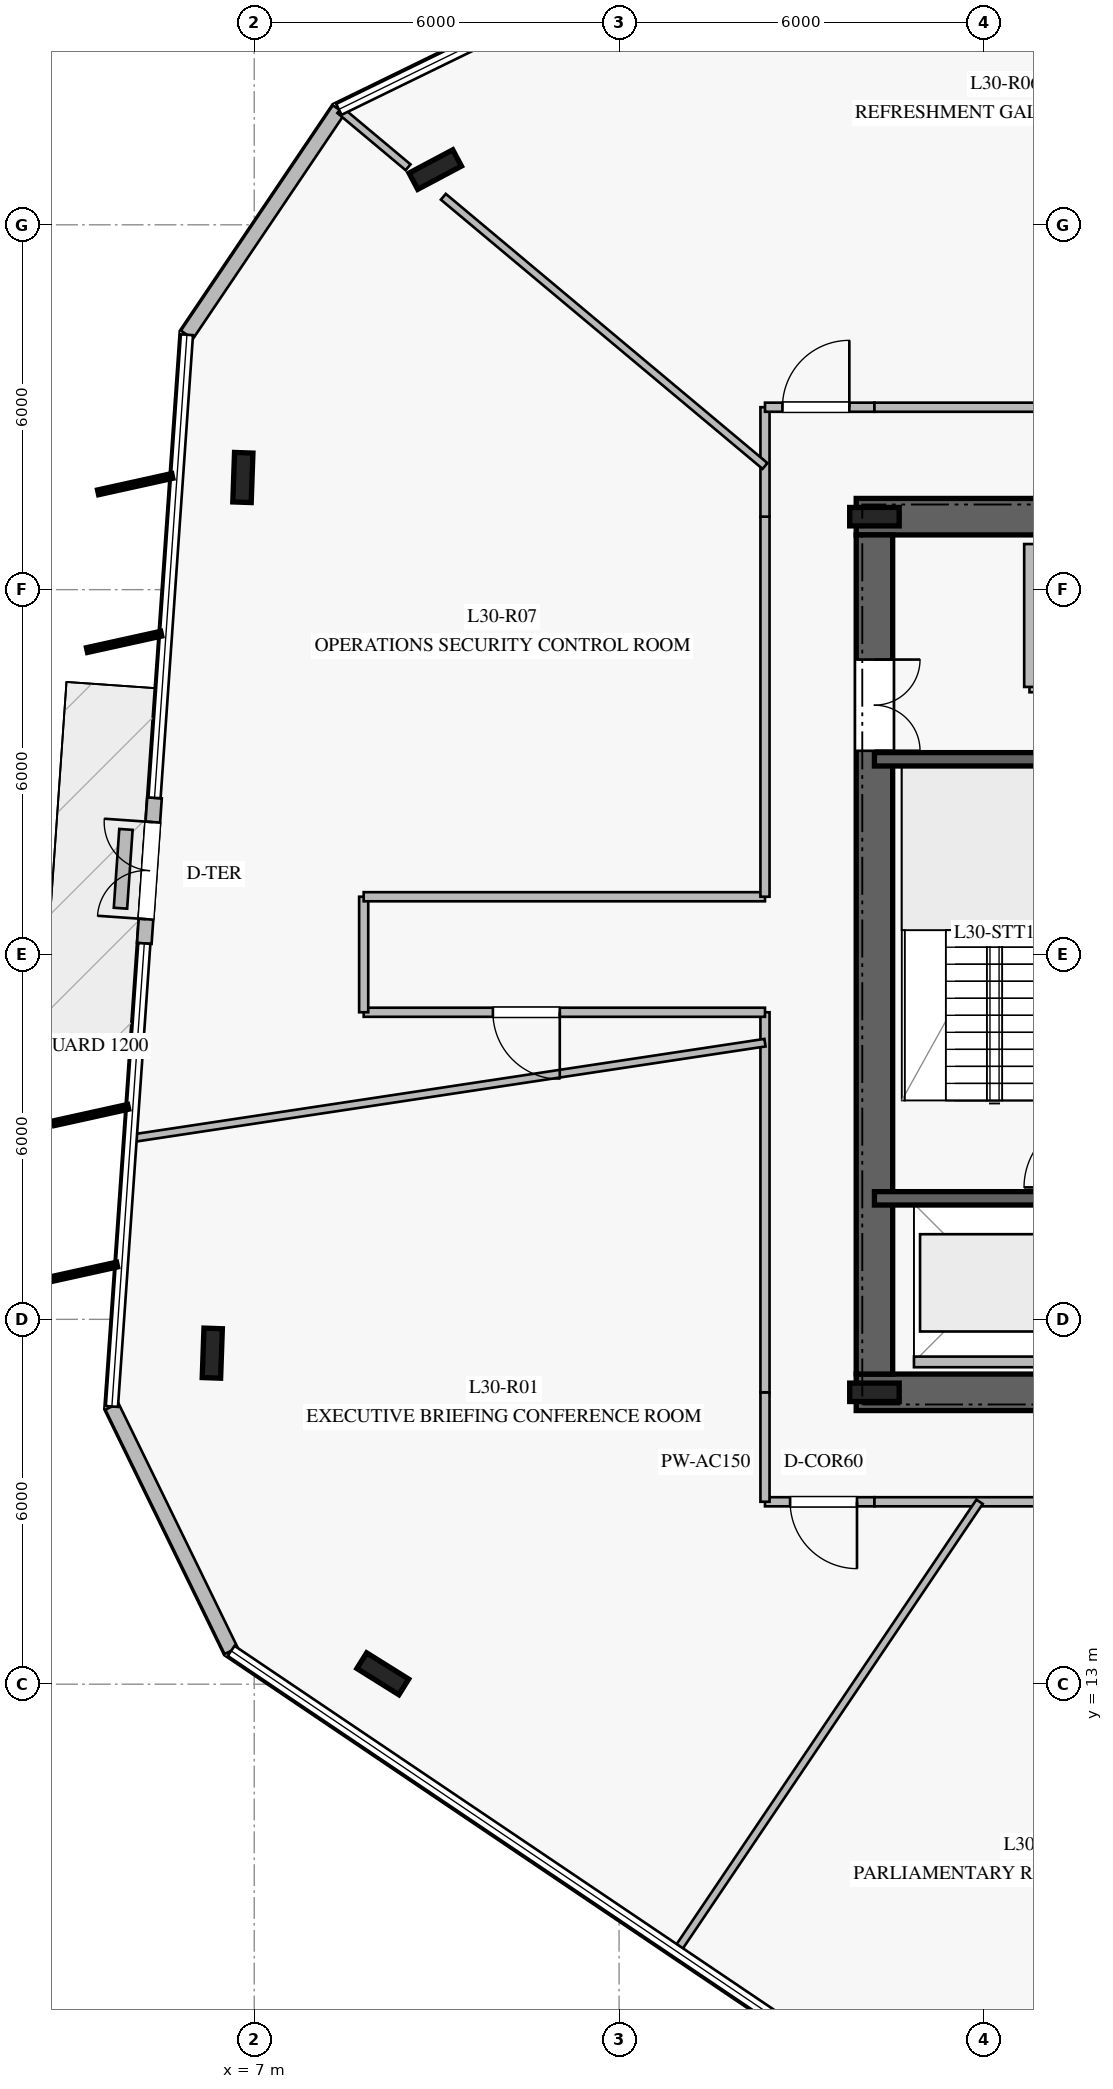
"""IFC4 building model, lengths in metres.
Left out: names, types, materials, properties, quantities, classifications, styles, units other than length and angle.
Written with IfcOpenShell. Run it as: python <this file> out.ifc"""

import sys

from ifc_helpers import new_model, si_unit, direction, frame, frame_2d, origin, origin_2d, place, context, subcontext, project, spatial, rectangle, i_section, extrude, element, fill, save


model = new_model("IFC4")
c1 = context("Model", 3, precision=1e-05, world=origin(), true_north=direction((0.0, 1.0)))
c2 = subcontext(c1, "Body", "Model", "MODEL_VIEW")
j1 = project(units=[si_unit("LENGTHUNIT", "METRE"), si_unit("PLANEANGLEUNIT", "RADIAN")], contexts=[c1])
p1 = place(None, origin())
s1 = spatial("IfcSite", under=j1, at=p1, CompositionType="ELEMENT")
p2 = place(p1, origin())
s2 = spatial("IfcBuilding", under=s1, at=p2, CompositionType="ELEMENT")
p3 = place(p2, frame((0.0, 0.0, 126.4)))
s3 = spatial("IfcBuildingStorey", under=s2, at=p3, CompositionType="ELEMENT", Elevation=126.4)
p4 = place(p3, frame((16.9, 17.8, 0.0), z_axis=(0.0, 0.0, 1.0), x_axis=(1.0, 0.0, 0.0)))
e1 = element("IfcWall", 1, at=p4, inside=s3, PredefinedType="SHEAR", context=c2, shape_type="SweptSolid", body=[
    extrude(rectangle(XDim=16.2, YDim=0.6, at=frame_2d((8.1, 0.0))), origin(), (0.0, 0.0, 1.0), 3.76),
])
p5 = place(p4, frame((5.05, 0.0, 0.0)))
e2 = element("IfcOpeningElement", 2, at=p5, cuts=e1, PredefinedType="OPENING", context=c2, shape_type="SweptSolid", body=[
    extrude(rectangle(XDim=1.2, YDim=2.25, at=frame_2d((0.6, 1.125))), frame((0.0, 0.31, 0.0), z_axis=(0.0, -1.0, 0.0), x_axis=(1.0, 0.0, 0.0)), (0.0, 0.0, 1.0), 0.62),
])
p6 = place(p4, frame((14.0, 0.0, 0.0)))
e3 = element("IfcOpeningElement", 3, at=p6, cuts=e1, PredefinedType="OPENING", context=c2, shape_type="SweptSolid", body=[
    extrude(rectangle(XDim=0.9, YDim=2.1, at=frame_2d((0.45, 1.05))), frame((0.0, 0.31, 0.0), z_axis=(0.0, -1.0, 0.0), x_axis=(1.0, 0.0, 0.0)), (0.0, 0.0, 1.0), 0.62),
])
p7 = place(p4, frame((9.25, 0.0, 0.0)))
e4 = element("IfcOpeningElement", 4, at=p7, cuts=e1, PredefinedType="OPENING", context=c2, shape_type="SweptSolid", body=[
    extrude(rectangle(XDim=1.1, YDim=2.2, at=frame_2d((0.55, 1.1))), frame((0.0, 0.31, 0.0), z_axis=(0.0, -1.0, 0.0), x_axis=(1.0, 0.0, 0.0)), (0.0, 0.0, 1.0), 0.62),
])
p8 = place(p3, frame((33.1, 32.2, 0.0), z_axis=(0.0, 0.0, 1.0), x_axis=(-1.0, 0.0, 0.0)))
e5 = element("IfcWall", 5, at=p8, inside=s3, PredefinedType="SHEAR", context=c2, shape_type="SweptSolid", body=[
    extrude(rectangle(XDim=16.2, YDim=0.6, at=frame_2d((8.1, 0.0))), origin(), (0.0, 0.0, 1.0), 3.76),
])
p9 = place(p8, frame((5.05, 0.0, 0.0)))
e6 = element("IfcOpeningElement", 6, at=p9, cuts=e5, PredefinedType="OPENING", context=c2, shape_type="SweptSolid", body=[
    extrude(rectangle(XDim=1.2, YDim=2.25, at=frame_2d((0.6, 1.125))), frame((0.0, 0.31, 0.0), z_axis=(0.0, -1.0, 0.0), x_axis=(1.0, 0.0, 0.0)), (0.0, 0.0, 1.0), 0.62),
])
p10 = place(p8, frame((11.85, 0.0, 0.0)))
e7 = element("IfcOpeningElement", 7, at=p10, cuts=e5, PredefinedType="OPENING", context=c2, shape_type="SweptSolid", body=[
    extrude(rectangle(XDim=1.1, YDim=2.2, at=frame_2d((0.55, 1.1))), frame((0.0, 0.31, 0.0), z_axis=(0.0, -1.0, 0.0), x_axis=(1.0, 0.0, 0.0)), (0.0, 0.0, 1.0), 0.62),
])
p11 = place(p8, frame((9.875, 0.0, 0.0)))
e8 = element("IfcOpeningElement", 8, at=p11, cuts=e5, PredefinedType="OPENING", context=c2, shape_type="SweptSolid", body=[
    extrude(rectangle(XDim=1.1, YDim=2.2, at=frame_2d((0.55, 1.1))), frame((0.0, 0.31, 0.0), z_axis=(0.0, -1.0, 0.0), x_axis=(1.0, 0.0, 0.0)), (0.0, 0.0, 1.0), 0.62),
])
p12 = place(p8, frame((7.9, 0.0, 0.0)))
e9 = element("IfcOpeningElement", 9, at=p12, cuts=e5, PredefinedType="OPENING", context=c2, shape_type="SweptSolid", body=[
    extrude(rectangle(XDim=1.1, YDim=2.2, at=frame_2d((0.55, 1.1))), frame((0.0, 0.31, 0.0), z_axis=(0.0, -1.0, 0.0), x_axis=(1.0, 0.0, 0.0)), (0.0, 0.0, 1.0), 0.62),
])
p13 = place(p3, frame((17.2, 31.9, 0.0), z_axis=(0.0, 0.0, 1.0), x_axis=(0.0, -1.0, 0.0)))
e10 = element("IfcWall", 10, at=p13, inside=s3, PredefinedType="SHEAR", context=c2, shape_type="SweptSolid", body=[
    extrude(rectangle(XDim=13.8, YDim=0.6, at=frame_2d((6.9, 0.0))), origin(), (0.0, 0.0, 1.0), 3.76),
])
p14 = place(p13, frame((2.05, 0.0, 0.0)))
e11 = element("IfcOpeningElement", 11, at=p14, cuts=e10, PredefinedType="OPENING", context=c2, shape_type="SweptSolid", body=[
    extrude(rectangle(XDim=1.5, YDim=2.2, at=frame_2d((0.75, 1.1))), frame((0.0, 0.31, 0.0), z_axis=(0.0, -1.0, 0.0), x_axis=(1.0, 0.0, 0.0)), (0.0, 0.0, 1.0), 0.62),
])
for number, where, z_axis, x_axis in (
    (12, (17.2, 17.8, 0.0), (0.0, 0.0, 1.0), (1.0, 0.0, 0.0)),
    (13, (17.2, 32.2, 0.0), (0.0, 0.0, 1.0), (1.0, 0.0, 0.0)),
):
    element("IfcColumn", number, at=place(p3, frame(where, z_axis=z_axis, x_axis=x_axis)), inside=s3, PredefinedType="COLUMN", context=c2, shape_type="SweptSolid", body=[
        extrude(i_section(OverallWidth=0.303, OverallDepth=0.814, WebThickness=0.021, FlangeThickness=0.04, at=origin_2d()), origin(), (0.0, 0.0, 1.0), 4.0),
    ])
for number, where, z_axis, x_axis in (
    (14, (17.2, 20.99, 0.0), (0.0, 0.0, 1.0), (1.0, 0.0, 0.0)),
    (15, (17.2, 28.21, 0.0), (0.0, 0.0, 1.0), (1.0, 0.0, 0.0)),
):
    element("IfcWall", number, at=place(p3, frame(where, z_axis=z_axis, x_axis=x_axis)), inside=s3, PredefinedType="SOLIDWALL", context=c2, shape_type="SweptSolid", body=[
        extrude(rectangle(XDim=3.72, YDim=0.22, at=frame_2d((1.86, 0.0))), origin(), (0.0, 0.0, 1.0), 3.76),
    ])
for number, where, z_axis, x_axis in (
    (16, (9.977, 37.908, 0.0), (0.0, 0.0, 1.0), (0.883, 0.469, 0.0)),
    (17, (6.813, 32.844, 0.0), (0.0, 0.0, 1.0), (0.035, 0.999, 0.0)),
    (18, (6.31, 18.444, 0.0), (0.0, 0.0, 1.0), (0.035, 0.999, 0.0)),
    (19, (9.114, 13.171, 0.0), (0.0, 0.0, 1.0), (-0.848, 0.53, 0.0)),
):
    element("IfcColumn", number, at=place(p3, frame(where, z_axis=z_axis, x_axis=x_axis)), inside=s3, PredefinedType="COLUMN", context=c2, shape_type="SweptSolid", body=[
        extrude(i_section(OverallWidth=0.303, OverallDepth=0.814, WebThickness=0.021, FlangeThickness=0.04, at=origin_2d()), origin(), (0.0, 0.0, 1.0), 4.0),
    ])
p15 = place(p3, frame((8.392, 38.898, 0.0), z_axis=(0.0, 0.0, 1.0), x_axis=(-0.559078804203, -0.82911452206, 0.0)))
e20 = element("IfcWall", 20, at=p15, inside=s3, PredefinedType="STANDARD", context=c2, shape_type="SweptSolid", body=[
    extrude(rectangle(XDim=4.47, YDim=0.24, at=frame_2d((2.235, 0.0))), origin(), (0.0, 0.0, 1.0), 3.76),
])
p16 = place(p3, frame((5.36, 27.576, 0.0), z_axis=(0.0, 0.0, 1.0), x_axis=(-0.070090302694, -0.997540650534, 0.0)))
e21 = element("IfcWall", 21, at=p16, inside=s3, PredefinedType="STANDARD", context=c2, shape_type="SweptSolid", body=[
    extrude(rectangle(XDim=2.4, YDim=0.24, at=frame_2d((1.2, 0.0))), origin(), (0.0, 0.0, 1.0), 3.76),
])
p17 = place(p16, frame((0.4, 0.0, 0.0)))
e22 = element("IfcOpeningElement", 22, at=p17, cuts=e21, PredefinedType="OPENING", context=c2, shape_type="SweptSolid", body=[
    extrude(rectangle(XDim=1.6, YDim=2.25, at=frame_2d((0.8, 1.125))), frame((0.0, 0.13, 0.0), z_axis=(0.0, -1.0, 0.0), x_axis=(1.0, 0.0, 0.0)), (0.0, 0.0, 1.0), 0.26),
])
p18 = place(p3, frame((4.659, 17.567, 0.0), z_axis=(0.0, 0.0, 1.0), x_axis=(0.438566687479, -0.898698648399, 0.0)))
e23 = element("IfcWall", 23, at=p18, inside=s3, PredefinedType="STANDARD", context=c2, shape_type="SweptSolid", body=[
    extrude(rectangle(XDim=4.472, YDim=0.24, at=frame_2d((2.236, 0.0))), origin(), (0.0, 0.0, 1.0), 3.76),
])
p19 = place(p3, frame((4.89, 27.057, 0.0), z_axis=(0.0, 0.0, 1.0), x_axis=(-0.069163294949, -0.997605352147, 0.0)))
e24 = element("IfcWall", 24, at=p19, inside=s3, PredefinedType="USERDEFINED", context=c2, shape_type="SweptSolid", body=[
    extrude(rectangle(XDim=1.299, YDim=0.22, at=frame_2d((0.649, 0.0))), origin(), (0.0, 0.0, 1.0), 0.4),
])
p20 = place(p3, frame((19.75, 29.4, 0.0), z_axis=(0.0, 0.0, 1.0), x_axis=(1.0, 0.0, 0.0)))
e25 = element("IfcWall", 25, at=p20, inside=s3, PredefinedType="PARTITIONING", context=c2, shape_type="SweptSolid", body=[
    extrude(rectangle(XDim=1.9, YDim=0.175, at=frame_2d((0.95, 0.0))), origin(), (0.0, 0.0, 1.0), 3.76),
])
p21 = place(p3, frame((19.75, 29.4, 0.0), z_axis=(0.0, 0.0, 1.0), x_axis=(0.0, 1.0, 0.0)))
e26 = element("IfcWall", 26, at=p21, inside=s3, PredefinedType="PARTITIONING", context=c2, shape_type="SweptSolid", body=[
    extrude(rectangle(XDim=2.35, YDim=0.175, at=frame_2d((1.175, 0.0))), origin(), (0.0, 0.0, 1.0), 3.76),
])
p22 = place(p3, frame((17.85, 18.3, 0.0), z_axis=(0.0, 0.0, 1.0), x_axis=(1.0, 0.0, 0.0)))
e27 = element("IfcWall", 27, at=p22, inside=s3, PredefinedType="PARTITIONING", context=c2, shape_type="SweptSolid", body=[
    extrude(rectangle(XDim=2.6, YDim=0.175, at=frame_2d((1.3, 0.0))), origin(), (0.0, 0.0, 1.0), 3.76),
])
p23 = place(p3, frame((17.2, 16.0, 0.0), z_axis=(0.0, 0.0, 1.0), x_axis=(-1.0, 0.0, 0.0)))
e28 = element("IfcWall", 28, at=p23, inside=s3, PredefinedType="PARTITIONING", context=c2, shape_type="SweptSolid", body=[
    extrude(rectangle(XDim=1.8, YDim=0.15, at=frame_2d((0.9, 0.0))), origin(), (0.0, 0.0, 1.0), 3.36),
])
p24 = place(p23, frame((0.287, 0.0, 0.0)))
e29 = element("IfcOpeningElement", 29, at=p24, cuts=e28, PredefinedType="OPENING", context=c2, shape_type="SweptSolid", body=[
    extrude(rectangle(XDim=1.1, YDim=2.2, at=frame_2d((0.55, 1.1))), frame((0.0, 0.085, 0.0), z_axis=(0.0, -1.0, 0.0), x_axis=(1.0, 0.0, 0.0)), (0.0, 0.0, 1.0), 0.17),
])
p25 = place(p3, frame((15.4, 16.0, 0.0), z_axis=(0.0, 0.0, 1.0), x_axis=(0.0, 1.0, 0.0)))
e30 = element("IfcWall", 30, at=p25, inside=s3, PredefinedType="PARTITIONING", context=c2, shape_type="SweptSolid", body=[
    extrude(rectangle(XDim=1.8, YDim=0.15, at=frame_2d((0.9, 0.0))), origin(), (0.0, 0.0, 1.0), 3.21),
])
p26 = place(p3, frame((15.4, 17.8, 0.0), z_axis=(0.0, 0.0, 1.0), x_axis=(0.0, 1.0, 0.0)))
e31 = element("IfcWall", 31, at=p26, inside=s3, PredefinedType="PARTITIONING", context=c2, shape_type="SweptSolid", body=[
    extrude(rectangle(XDim=6.25, YDim=0.15, at=frame_2d((3.125, 0.0))), origin(), (0.0, 0.0, 1.0), 3.21),
])
p27 = place(p3, frame((15.4, 24.05, 0.0), z_axis=(0.0, 0.0, 1.0), x_axis=(-1.0, 0.0, 0.0)))
e32 = element("IfcWall", 32, at=p27, inside=s3, PredefinedType="PARTITIONING", context=c2, shape_type="SweptSolid", body=[
    extrude(rectangle(XDim=6.6, YDim=0.15, at=frame_2d((3.3, 0.0))), origin(), (0.0, 0.0, 1.0), 3.36),
])
p28 = place(p27, frame((3.375, 0.0, 0.0)))
e33 = element("IfcOpeningElement", 33, at=p28, cuts=e32, PredefinedType="OPENING", context=c2, shape_type="SweptSolid", body=[
    extrude(rectangle(XDim=1.1, YDim=2.2, at=frame_2d((0.55, 1.1))), frame((0.0, 0.085, 0.0), z_axis=(0.0, -1.0, 0.0), x_axis=(1.0, 0.0, 0.0)), (0.0, 0.0, 1.0), 0.17),
])
p29 = place(p3, frame((8.8, 24.05, 0.0), z_axis=(0.0, 0.0, 1.0), x_axis=(0.0, 1.0, 0.0)))
e34 = element("IfcWall", 34, at=p29, inside=s3, PredefinedType="PARTITIONING", context=c2, shape_type="SweptSolid", body=[
    extrude(rectangle(XDim=1.9, YDim=0.15, at=frame_2d((0.95, 0.0))), origin(), (0.0, 0.0, 1.0), 3.76),
])
p30 = place(p3, frame((8.8, 25.95, 0.0), z_axis=(0.0, 0.0, 1.0), x_axis=(1.0, 0.0, 0.0)))
e35 = element("IfcWall", 35, at=p30, inside=s3, PredefinedType="PARTITIONING", context=c2, shape_type="SweptSolid", body=[
    extrude(rectangle(XDim=6.6, YDim=0.15, at=frame_2d((3.3, 0.0))), origin(), (0.0, 0.0, 1.0), 3.36),
])
p31 = place(p3, frame((15.4, 25.95, 0.0), z_axis=(0.0, 0.0, 1.0), x_axis=(0.0, 1.0, 0.0)))
e36 = element("IfcWall", 36, at=p31, inside=s3, PredefinedType="PARTITIONING", context=c2, shape_type="SweptSolid", body=[
    extrude(rectangle(XDim=6.25, YDim=0.15, at=frame_2d((3.125, 0.0))), origin(), (0.0, 0.0, 1.0), 3.21),
])
p32 = place(p3, frame((15.4, 32.2, 0.0), z_axis=(0.0, 0.0, 1.0), x_axis=(0.0, 1.0, 0.0)))
e37 = element("IfcWall", 37, at=p32, inside=s3, PredefinedType="PARTITIONING", context=c2, shape_type="SweptSolid", body=[
    extrude(rectangle(XDim=1.8, YDim=0.15, at=frame_2d((0.9, 0.0))), origin(), (0.0, 0.0, 1.0), 3.21),
])
p33 = place(p3, frame((15.4, 34.0, 0.0), z_axis=(0.0, 0.0, 1.0), x_axis=(1.0, 0.0, 0.0)))
e38 = element("IfcWall", 38, at=p33, inside=s3, PredefinedType="PARTITIONING", context=c2, shape_type="SweptSolid", body=[
    extrude(rectangle(XDim=1.8, YDim=0.15, at=frame_2d((0.9, 0.0))), origin(), (0.0, 0.0, 1.0), 3.76),
])
p34 = place(p33, frame((0.287, 0.0, 0.0)))
e39 = element("IfcOpeningElement", 39, at=p34, cuts=e38, PredefinedType="OPENING", context=c2, shape_type="SweptSolid", body=[
    extrude(rectangle(XDim=1.1, YDim=2.2, at=frame_2d((0.55, 1.1))), frame((0.0, 0.085, 0.0), z_axis=(0.0, -1.0, 0.0), x_axis=(1.0, 0.0, 0.0)), (0.0, 0.0, 1.0), 0.17),
])
for number, where, z_axis, x_axis in (
    (40, (17.2, 34.0, 0.0), (0.0, 0.0, 1.0), (1.0, 0.0, 0.0)),
    (41, (24.05, 16.0, 0.0), (0.0, 0.0, 1.0), (-1.0, 0.0, 0.0)),
):
    element("IfcWall", number, at=place(p3, frame(where, z_axis=z_axis, x_axis=x_axis)), inside=s3, PredefinedType="PARTITIONING", context=c2, shape_type="SweptSolid", body=[
        extrude(rectangle(XDim=6.85, YDim=0.15, at=frame_2d((3.425, 0.0))), origin(), (0.0, 0.0, 1.0), 3.21),
    ])
p35 = place(p3, frame((15.4, 33.034, 0.0), z_axis=(0.0, 0.0, 1.0), x_axis=(-0.766876366805, 0.641794856661, 0.0)))
e42 = element("IfcWall", 42, at=p35, inside=s3, PredefinedType="PARTITIONING", context=c2, shape_type="SweptSolid", body=[
    extrude(rectangle(XDim=6.898, YDim=0.125, at=frame_2d((3.449, 0.0))), origin(), (0.0, 0.0, 1.0), 3.36),
])
p36 = place(p3, frame((9.53, 37.946, 0.0), z_axis=(0.0, 0.0, 1.0), x_axis=(-0.766853077224, 0.641822684199, 0.0)))
e43 = element("IfcWall", 43, at=p36, inside=s3, PredefinedType="PARTITIONING", context=c2, shape_type="SweptSolid", body=[
    extrude(rectangle(XDim=1.465, YDim=0.125, at=frame_2d((0.732, 0.0))), origin(), (0.0, 0.0, 1.0), 3.76),
])
p37 = place(p3, frame((15.4, 23.55, 0.0), z_axis=(0.0, 0.0, 1.0), x_axis=(-0.988772027517, -0.14943184935, 0.0)))
e44 = element("IfcWall", 44, at=p37, inside=s3, PredefinedType="PARTITIONING", context=c2, shape_type="SweptSolid", body=[
    extrude(rectangle(XDim=10.533, YDim=0.125, at=frame_2d((5.267, 0.0))), origin(), (0.0, 0.0, 1.0), 3.16),
])
p38 = place(p3, frame((18.929, 16.0, 0.0), z_axis=(0.0, 0.0, 1.0), x_axis=(-0.559161840845, -0.829058523714, 0.0)))
e45 = element("IfcWall", 45, at=p38, inside=s3, PredefinedType="PARTITIONING", context=c2, shape_type="SweptSolid", body=[
    extrude(rectangle(XDim=8.899, YDim=0.125, at=frame_2d((4.45, 0.0))), origin(), (0.0, 0.0, 1.0), 3.05),
])
p39 = place(p17, frame((1.6, 0.0, 0.0), z_axis=(0.0, 0.0, 1.0), x_axis=(-1.0, 0.0, 0.0)))
e46 = element("IfcDoor", 46, at=p39, inside=s3, OperationType="DOUBLE_DOOR_SINGLE_SWING", PredefinedType="DOOR", context=c2, shape_type="SweptSolid", body=[
    extrude(rectangle(XDim=1.6, YDim=2.25, at=frame_2d((0.8, 1.125))), frame((0.0, 0.025, 0.0), z_axis=(0.0, -1.0, 0.0), x_axis=(1.0, 0.0, 0.0)), (0.0, 0.0, 1.0), 0.05),
])
fill(e22, e46)
p40 = place(p14, origin())
e47 = element("IfcDoor", 47, at=p40, inside=s3, OperationType="DOUBLE_DOOR_SINGLE_SWING", PredefinedType="DOOR", context=c2, shape_type="SweptSolid", body=[
    extrude(rectangle(XDim=1.5, YDim=2.2, at=frame_2d((0.75, 1.1))), frame((0.0, 0.025, 0.0), z_axis=(0.0, -1.0, 0.0), x_axis=(1.0, 0.0, 0.0)), (0.0, 0.0, 1.0), 0.05),
])
fill(e11, e47)
p41 = place(p24, origin())
e48 = element("IfcDoor", 48, at=p41, inside=s3, OperationType="SINGLE_SWING_LEFT", PredefinedType="DOOR", context=c2, shape_type="SweptSolid", body=[
    extrude(rectangle(XDim=1.1, YDim=2.2, at=frame_2d((0.55, 1.1))), frame((0.0, 0.025, 0.0), z_axis=(0.0, -1.0, 0.0), x_axis=(1.0, 0.0, 0.0)), (0.0, 0.0, 1.0), 0.05),
])
fill(e29, e48)
p42 = place(p34, origin())
e49 = element("IfcDoor", 49, at=p42, inside=s3, OperationType="SINGLE_SWING_RIGHT", PredefinedType="DOOR", context=c2, shape_type="SweptSolid", body=[
    extrude(rectangle(XDim=1.1, YDim=2.2, at=frame_2d((0.55, 1.1))), frame((0.0, 0.025, 0.0), z_axis=(0.0, -1.0, 0.0), x_axis=(1.0, 0.0, 0.0)), (0.0, 0.0, 1.0), 0.05),
])
fill(e39, e49)
p43 = place(p28, origin())
e50 = element("IfcDoor", 50, at=p43, inside=s3, OperationType="SINGLE_SWING_LEFT", PredefinedType="DOOR", context=c2, shape_type="SweptSolid", body=[
    extrude(rectangle(XDim=1.1, YDim=2.2, at=frame_2d((0.55, 1.1))), frame((0.0, 0.025, 0.0), z_axis=(0.0, -1.0, 0.0), x_axis=(1.0, 0.0, 0.0)), (0.0, 0.0, 1.0), 0.05),
])
fill(e33, e50)
save(model, sys.argv[1])
